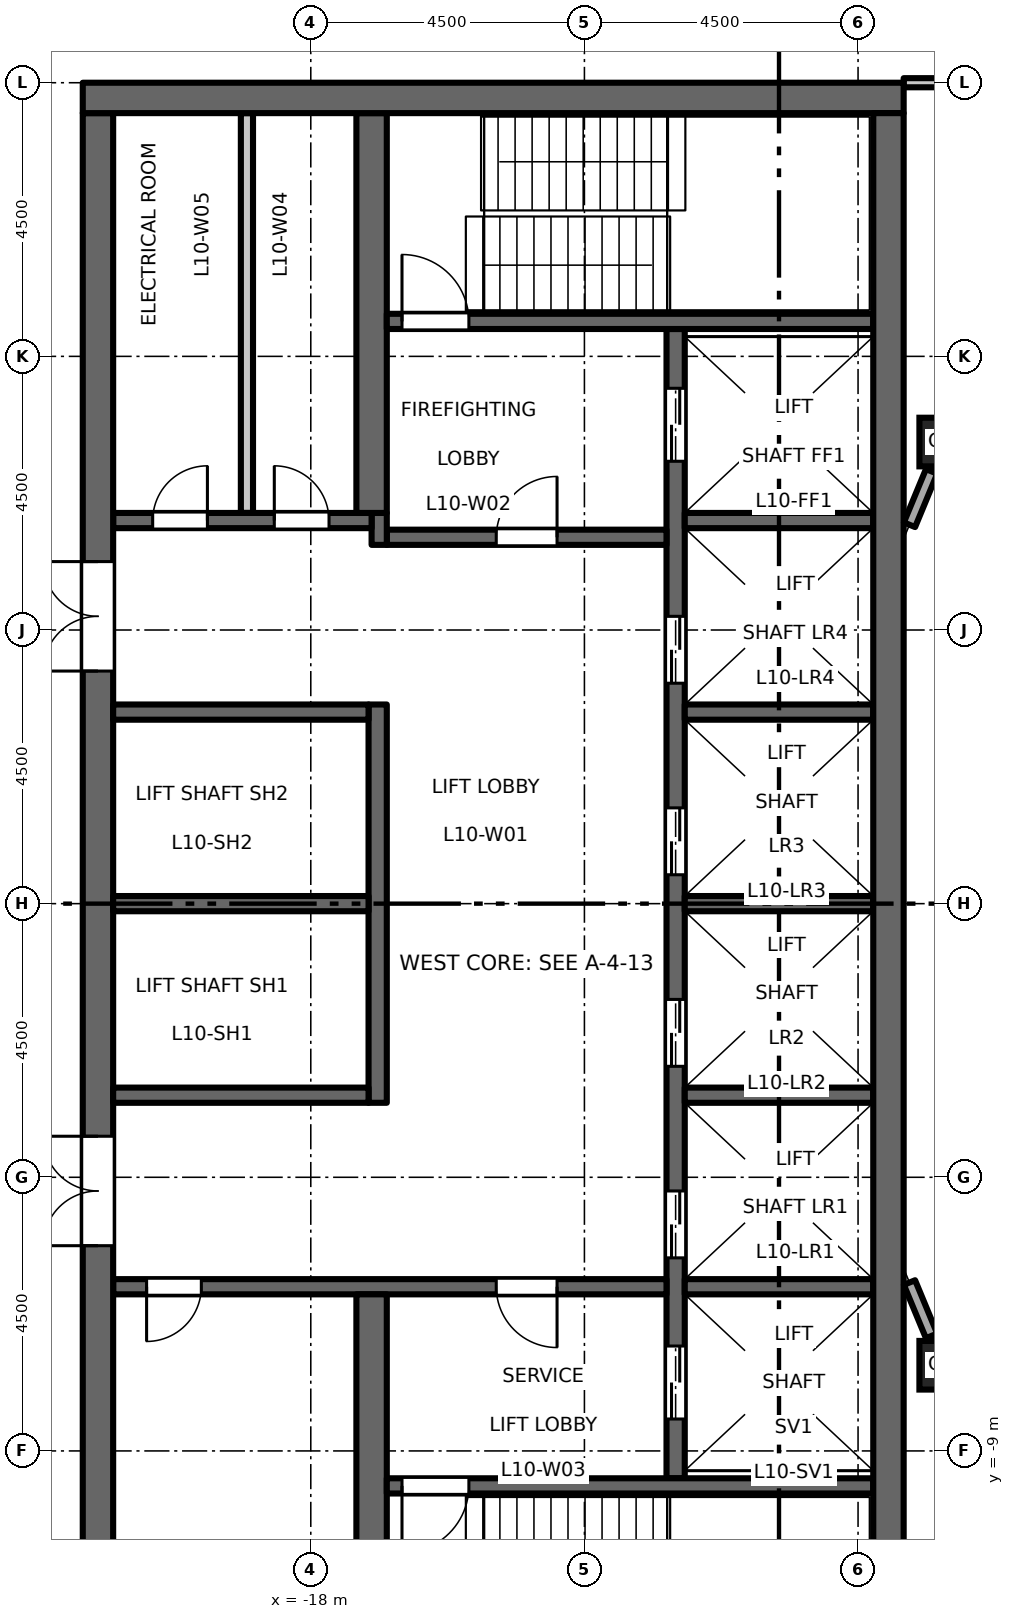
"""IFC4 building model, lengths in metres.
Left out: names, types, materials, properties, quantities, classifications, styles, units other than length and angle.
Written with IfcOpenShell. Run it as: python <this file> out.ifc"""

import sys

from ifc_helpers import new_model, si_unit, direction, frame, frame_2d, origin, origin_2d, place, context, subcontext, project, spatial, rectangle, hollow_rectangle, extrude, element, fill, save


model = new_model("IFC4")
c1 = context("Model", 3, precision=1e-05, world=origin(), true_north=direction((0.0, 1.0)))
c2 = subcontext(c1, "Body", "Model", "MODEL_VIEW")
j1 = project(units=[si_unit("LENGTHUNIT", "METRE"), si_unit("PLANEANGLEUNIT", "RADIAN")], contexts=[c1])
p1 = place(None, origin())
s1 = spatial("IfcSite", under=j1, at=p1, CompositionType="ELEMENT")
p2 = place(p1, origin())
s2 = spatial("IfcBuilding", under=s1, at=p2, CompositionType="ELEMENT")
p3 = place(p2, frame((0.0, 0.0, 49.2)))
s3 = spatial("IfcBuildingStorey", under=s2, at=p3, CompositionType="ELEMENT", Elevation=49.2)
for number, where, z_axis, x_axis in (
    (1, (-7.591, -7.591, 0.0), (0.0, 0.0, 1.0), (1.0, 0.0, 0.0)),
    (2, (-7.591, 7.591, 0.0), (0.0, 0.0, 1.0), (1.0, 0.0, 0.0)),
):
    element("IfcColumn", number, at=place(p3, frame(where, z_axis=z_axis, x_axis=x_axis)), inside=s3, PredefinedType="COLUMN", context=c2, shape_type="SweptSolid", body=[
        extrude(hollow_rectangle(XDim=0.8, YDim=0.8, WallThickness=0.05, at=origin_2d()), origin(), (0.0, 0.0, 1.0), 4.5),
    ])
p4 = place(p3, frame((-12.0, -9.45, 0.0), z_axis=(0.0, 0.0, 1.0), x_axis=(0.0, 1.0, 0.0)))
e3 = element("IfcWall", 3, at=p4, inside=s3, PredefinedType="SHEAR", context=c2, shape_type="SweptSolid", body=[
    extrude(rectangle(XDim=18.9, YDim=0.3, at=frame_2d((9.45, 0.0))), origin(), (0.0, 0.0, 1.0), 4.35),
])
p5 = place(p4, frame((3.625, 0.0, 0.0)))
e4 = element("IfcOpeningElement", 4, at=p5, cuts=e3, PredefinedType="OPENING", context=c2, shape_type="SweptSolid", body=[
    extrude(rectangle(XDim=1.1, YDim=2.1, at=frame_2d((0.55, 1.05))), frame((0.0, 0.16, 0.0), z_axis=(0.0, -1.0, 0.0), x_axis=(1.0, 0.0, 0.0)), (0.0, 0.0, 1.0), 0.32),
])
p6 = place(p4, frame((6.775, 0.0, 0.0)))
e5 = element("IfcOpeningElement", 5, at=p6, cuts=e3, PredefinedType="OPENING", context=c2, shape_type="SweptSolid", body=[
    extrude(rectangle(XDim=1.1, YDim=2.1, at=frame_2d((0.55, 1.05))), frame((0.0, 0.16, 0.0), z_axis=(0.0, -1.0, 0.0), x_axis=(1.0, 0.0, 0.0)), (0.0, 0.0, 1.0), 0.32),
])
p7 = place(p4, frame((9.925, 0.0, 0.0)))
e6 = element("IfcOpeningElement", 6, at=p7, cuts=e3, PredefinedType="OPENING", context=c2, shape_type="SweptSolid", body=[
    extrude(rectangle(XDim=1.1, YDim=2.1, at=frame_2d((0.55, 1.05))), frame((0.0, 0.16, 0.0), z_axis=(0.0, -1.0, 0.0), x_axis=(1.0, 0.0, 0.0)), (0.0, 0.0, 1.0), 0.32),
])
p8 = place(p4, frame((13.075, 0.0, 0.0)))
e7 = element("IfcOpeningElement", 7, at=p8, cuts=e3, PredefinedType="OPENING", context=c2, shape_type="SweptSolid", body=[
    extrude(rectangle(XDim=1.1, YDim=2.1, at=frame_2d((0.55, 1.05))), frame((0.0, 0.16, 0.0), z_axis=(0.0, -1.0, 0.0), x_axis=(1.0, 0.0, 0.0)), (0.0, 0.0, 1.0), 0.32),
])
p9 = place(p4, frame((16.725, 0.0, 0.0)))
e8 = element("IfcOpeningElement", 8, at=p9, cuts=e3, PredefinedType="OPENING", context=c2, shape_type="SweptSolid", body=[
    extrude(rectangle(XDim=1.2, YDim=2.1, at=frame_2d((0.6, 1.05))), frame((0.0, 0.16, 0.0), z_axis=(0.0, -1.0, 0.0), x_axis=(1.0, 0.0, 0.0)), (0.0, 0.0, 1.0), 0.32),
])
p10 = place(p4, frame((0.975, 0.0, 0.0)))
e9 = element("IfcOpeningElement", 9, at=p10, cuts=e3, PredefinedType="OPENING", context=c2, shape_type="SweptSolid", body=[
    extrude(rectangle(XDim=1.2, YDim=2.1, at=frame_2d((0.6, 1.05))), frame((0.0, 0.16, 0.0), z_axis=(0.0, -1.0, 0.0), x_axis=(1.0, 0.0, 0.0)), (0.0, 0.0, 1.0), 0.32),
])
p11 = place(p3, frame((-12.15, 6.025, 0.0), z_axis=(0.0, 0.0, 1.0), x_axis=(-1.0, 0.0, 0.0)))
e10 = element("IfcWall", 10, at=p11, inside=s3, PredefinedType="SHEAR", context=c2, shape_type="SweptSolid", body=[
    extrude(rectangle(XDim=4.6, YDim=0.25, at=frame_2d((2.3, 0.0))), origin(), (0.0, 0.0, 1.0), 4.35),
])
p12 = place(p11, frame((1.8, 0.0, 0.0)))
e11 = element("IfcOpeningElement", 11, at=p12, cuts=e10, PredefinedType="OPENING", context=c2, shape_type="SweptSolid", body=[
    extrude(rectangle(XDim=1.0, YDim=2.1, at=frame_2d((0.5, 1.05))), frame((0.0, 0.135, 0.0), z_axis=(0.0, -1.0, 0.0), x_axis=(1.0, 0.0, 0.0)), (0.0, 0.0, 1.0), 0.27),
])
p13 = place(p3, frame((-16.875, 5.9, 0.0), z_axis=(0.0, 0.0, 1.0), x_axis=(0.0, 1.0, 0.0)))
e12 = element("IfcWall", 12, at=p13, inside=s3, PredefinedType="SHEAR", context=c2, shape_type="SweptSolid", body=[
    extrude(rectangle(XDim=0.525, YDim=0.25, at=frame_2d((0.263, 0.0))), origin(), (0.0, 0.0, 1.0), 4.35),
])
p14 = place(p3, frame((-17.0, 6.3, 0.0), z_axis=(0.0, 0.0, 1.0), x_axis=(-1.0, 0.0, 0.0)))
e13 = element("IfcWall", 13, at=p14, inside=s3, PredefinedType="SHEAR", context=c2, shape_type="SweptSolid", body=[
    extrude(rectangle(XDim=4.25, YDim=0.25, at=frame_2d((2.125, 0.0))), origin(), (0.0, 0.0, 1.0), 4.35),
])
p15 = place(p14, frame((0.7, 0.0, 0.0)))
e14 = element("IfcOpeningElement", 14, at=p15, cuts=e13, PredefinedType="OPENING", context=c2, shape_type="SweptSolid", body=[
    extrude(rectangle(XDim=0.9, YDim=2.1, at=frame_2d((0.45, 1.05))), frame((0.0, 0.135, 0.0), z_axis=(0.0, -1.0, 0.0), x_axis=(1.0, 0.0, 0.0)), (0.0, 0.0, 1.0), 0.27),
])
p16 = place(p14, frame((2.7, 0.0, 0.0)))
e15 = element("IfcOpeningElement", 15, at=p16, cuts=e13, PredefinedType="OPENING", context=c2, shape_type="SweptSolid", body=[
    extrude(rectangle(XDim=0.9, YDim=2.1, at=frame_2d((0.45, 1.05))), frame((0.0, 0.135, 0.0), z_axis=(0.0, -1.0, 0.0), x_axis=(1.0, 0.0, 0.0)), (0.0, 0.0, 1.0), 0.27),
])
p17 = place(p3, frame((-12.15, -6.3, 0.0), z_axis=(0.0, 0.0, 1.0), x_axis=(-1.0, 0.0, 0.0)))
e16 = element("IfcWall", 16, at=p17, inside=s3, PredefinedType="SHEAR", context=c2, shape_type="SweptSolid", body=[
    extrude(rectangle(XDim=9.1, YDim=0.25, at=frame_2d((4.55, 0.0))), origin(), (0.0, 0.0, 1.0), 4.35),
])
p18 = place(p17, frame((1.8, 0.0, 0.0)))
e17 = element("IfcOpeningElement", 17, at=p18, cuts=e16, PredefinedType="OPENING", context=c2, shape_type="SweptSolid", body=[
    extrude(rectangle(XDim=1.0, YDim=2.1, at=frame_2d((0.5, 1.05))), frame((0.0, 0.135, 0.0), z_axis=(0.0, -1.0, 0.0), x_axis=(1.0, 0.0, 0.0)), (0.0, 0.0, 1.0), 0.27),
])
p19 = place(p17, frame((7.65, 0.0, 0.0)))
e18 = element("IfcOpeningElement", 18, at=p19, cuts=e16, PredefinedType="OPENING", context=c2, shape_type="SweptSolid", body=[
    extrude(rectangle(XDim=0.9, YDim=2.1, at=frame_2d((0.45, 1.05))), frame((0.0, 0.135, 0.0), z_axis=(0.0, -1.0, 0.0), x_axis=(1.0, 0.0, 0.0)), (0.0, 0.0, 1.0), 0.27),
])
p20 = place(p3, frame((-21.5, -13.0, 0.0), z_axis=(0.0, 0.0, 1.0), x_axis=(0.0, 1.0, 0.0)))
e19 = element("IfcWall", 19, at=p20, inside=s3, PredefinedType="SHEAR", context=c2, shape_type="SweptSolid", body=[
    extrude(rectangle(XDim=26.0, YDim=0.5, at=frame_2d((13.0, 0.0))), origin(), (0.0, 0.0, 1.0), 4.35),
])
p21 = place(p20, frame((16.825, 0.0, 0.0)))
e20 = element("IfcOpeningElement", 20, at=p21, cuts=e19, PredefinedType="OPENING", context=c2, shape_type="SweptSolid", body=[
    extrude(rectangle(XDim=1.8, YDim=2.1, at=frame_2d((0.9, 1.05))), frame((0.0, 0.26, 0.0), z_axis=(0.0, -1.0, 0.0), x_axis=(1.0, 0.0, 0.0)), (0.0, 0.0, 1.0), 0.52),
])
p22 = place(p20, frame((7.375, 0.0, 0.0)))
e21 = element("IfcOpeningElement", 21, at=p22, cuts=e19, PredefinedType="OPENING", context=c2, shape_type="SweptSolid", body=[
    extrude(rectangle(XDim=1.8, YDim=2.1, at=frame_2d((0.9, 1.05))), frame((0.0, 0.26, 0.0), z_axis=(0.0, -1.0, 0.0), x_axis=(1.0, 0.0, 0.0)), (0.0, 0.0, 1.0), 0.52),
])
p23 = place(p3, frame((-19.05, 6.425, 0.0), z_axis=(0.0, 0.0, 1.0), x_axis=(0.0, 1.0, 0.0)))
e22 = element("IfcWall", 22, at=p23, inside=s3, PredefinedType="PARTITIONING", context=c2, shape_type="SweptSolid", body=[
    extrude(rectangle(XDim=6.575, YDim=0.2, at=frame_2d((3.288, 0.0))), origin(), (0.0, 0.0, 1.0), 4.35),
])
p24 = place(p3, frame((-16.9, -3.275, 0.0), z_axis=(0.0, 0.0, 1.0), x_axis=(0.0, 1.0, 0.0)))
e23 = element("IfcWall", 23, at=p24, inside=s3, PredefinedType="SHEAR", context=c2, shape_type="SweptSolid", body=[
    extrude(rectangle(XDim=6.55, YDim=0.3, at=frame_2d((3.275, 0.0))), origin(), (0.0, 0.0, 1.0), 4.35),
])
for number, where, z_axis, x_axis in (
    (24, (-17.05, 0.0, 0.0), (0.0, 0.0, 1.0), (-1.0, 0.0, 0.0)),
    (25, (-17.05, 3.15, 0.0), (0.0, 0.0, 1.0), (-1.0, 0.0, 0.0)),
    (26, (-17.05, -3.15, 0.0), (0.0, 0.0, 1.0), (-1.0, 0.0, 0.0)),
):
    element("IfcWall", number, at=place(p3, frame(where, z_axis=z_axis, x_axis=x_axis)), inside=s3, PredefinedType="SHEAR", context=c2, shape_type="SweptSolid", body=[
        extrude(rectangle(XDim=4.2, YDim=0.25, at=frame_2d((2.1, 0.0))), origin(), (0.0, 0.0, 1.0), 4.35),
    ])
for number, where, z_axis, x_axis in (
    (27, (-17.0, 6.425, 0.0), (0.0, 0.0, 1.0), (0.0, 1.0, 0.0)),
    (28, (-17.0, -13.0, 0.0), (0.0, 0.0, 1.0), (0.0, 1.0, 0.0)),
):
    element("IfcWall", number, at=place(p3, frame(where, z_axis=z_axis, x_axis=x_axis)), inside=s3, PredefinedType="SHEAR", context=c2, shape_type="SweptSolid", body=[
        extrude(rectangle(XDim=6.575, YDim=0.5, at=frame_2d((3.288, 0.0))), origin(), (0.0, 0.0, 1.0), 4.35),
    ])
for number, where, z_axis, x_axis in (
    (29, (-8.75, 0.0, 0.0), (0.0, 0.0, 1.0), (-1.0, 0.0, 0.0)),
    (30, (-8.75, 3.15, 0.0), (0.0, 0.0, 1.0), (-1.0, 0.0, 0.0)),
    (31, (-8.75, 6.3, 0.0), (0.0, 0.0, 1.0), (-1.0, 0.0, 0.0)),
    (32, (-8.75, -3.15, 0.0), (0.0, 0.0, 1.0), (-1.0, 0.0, 0.0)),
    (33, (-8.75, -6.3, 0.0), (0.0, 0.0, 1.0), (-1.0, 0.0, 0.0)),
):
    element("IfcWall", number, at=place(p3, frame(where, z_axis=z_axis, x_axis=x_axis)), inside=s3, PredefinedType="SHEAR", context=c2, shape_type="SweptSolid", body=[
        extrude(rectangle(XDim=3.1, YDim=0.25, at=frame_2d((1.55, 0.0))), origin(), (0.0, 0.0, 1.0), 4.35),
    ])
p25 = place(p3, frame((-8.75, 9.575, 0.0), z_axis=(0.0, 0.0, 1.0), x_axis=(-1.0, 0.0, 0.0)))
e34 = element("IfcWall", 34, at=p25, inside=s3, PredefinedType="SHEAR", context=c2, shape_type="SweptSolid", body=[
    extrude(rectangle(XDim=8.0, YDim=0.25, at=frame_2d((4.0, 0.0))), origin(), (0.0, 0.0, 1.0), 4.35),
])
p26 = place(p25, frame((6.65, 0.0, 0.0)))
e35 = element("IfcOpeningElement", 35, at=p26, cuts=e34, PredefinedType="OPENING", context=c2, shape_type="SweptSolid", body=[
    extrude(rectangle(XDim=1.1, YDim=2.1, at=frame_2d((0.55, 1.05))), frame((0.0, 0.135, 0.0), z_axis=(0.0, -1.0, 0.0), x_axis=(1.0, 0.0, 0.0)), (0.0, 0.0, 1.0), 0.27),
])
p27 = place(p3, frame((-8.75, -9.575, 0.0), z_axis=(0.0, 0.0, 1.0), x_axis=(-1.0, 0.0, 0.0)))
e36 = element("IfcWall", 36, at=p27, inside=s3, PredefinedType="SHEAR", context=c2, shape_type="SweptSolid", body=[
    extrude(rectangle(XDim=8.0, YDim=0.25, at=frame_2d((4.0, 0.0))), origin(), (0.0, 0.0, 1.0), 4.35),
])
p28 = place(p27, frame((6.65, 0.0, 0.0)))
e37 = element("IfcOpeningElement", 37, at=p28, cuts=e36, PredefinedType="OPENING", context=c2, shape_type="SweptSolid", body=[
    extrude(rectangle(XDim=1.1, YDim=2.1, at=frame_2d((0.55, 1.05))), frame((0.0, 0.135, 0.0), z_axis=(0.0, -1.0, 0.0), x_axis=(1.0, 0.0, 0.0)), (0.0, 0.0, 1.0), 0.27),
])
p29 = place(p3, frame((-8.25, 13.25, 0.0), z_axis=(0.0, 0.0, 1.0), x_axis=(-1.0, 0.0, 0.0)))
e38 = element("IfcWall", 38, at=p29, inside=s3, PredefinedType="SHEAR", context=c2, shape_type="SweptSolid", body=[
    extrude(rectangle(XDim=13.5, YDim=0.5, at=frame_2d((6.75, 0.0))), origin(), (0.0, 0.0, 1.0), 4.35),
])
p30 = place(p3, frame((-8.5, -13.0, 0.0), z_axis=(0.0, 0.0, 1.0), x_axis=(0.0, 1.0, 0.0)))
e39 = element("IfcWall", 39, at=p30, inside=s3, PredefinedType="SHEAR", context=c2, shape_type="SweptSolid", body=[
    extrude(rectangle(XDim=26.0, YDim=0.5, at=frame_2d((13.0, 0.0))), origin(), (0.0, 0.0, 1.0), 4.35),
])
for number, where, z_axis, x_axis in (
    (40, (-7.791, 7.108, 0.0), (0.0, 0.0, 1.0), (-0.383, -0.924, 0.0)),
    (41, (-8.154, -6.231, 0.0), (0.0, 0.0, 1.0), (0.383, -0.924, 0.0)),
):
    element("IfcWall", number, at=place(p3, frame(where, z_axis=z_axis, x_axis=x_axis)), inside=s3, PredefinedType="STANDARD", context=c2, shape_type="SweptSolid", body=[
        extrude(rectangle(XDim=0.949, YDim=0.2, at=frame_2d((0.475, 0.0))), origin(), (0.0, 0.0, 1.0), 3.73),
    ])
p31 = place(p3, frame((-8.25, 13.5, 0.0), z_axis=(0.0, 0.0, 1.0), x_axis=(1.0, 0.0, 0.0)))
e42 = element("IfcWall", 42, at=p31, inside=s3, PredefinedType="PARTITIONING", context=c2, shape_type="SweptSolid", body=[
    extrude(rectangle(XDim=16.5, YDim=0.15, at=frame_2d((8.25, 0.0))), origin(), (0.0, 0.0, 1.0), 3.85),
])
p32 = place(p31, frame((0.65, 0.0, 0.0)))
e43 = element("IfcOpeningElement", 43, at=p32, cuts=e42, PredefinedType="OPENING", context=c2, shape_type="SweptSolid", body=[
    extrude(rectangle(XDim=1.0, YDim=2.1, at=frame_2d((0.5, 1.05))), frame((0.0, 0.085, 0.0), z_axis=(0.0, -1.0, 0.0), x_axis=(1.0, 0.0, 0.0)), (0.0, 0.0, 1.0), 0.17),
])
p33 = place(p12, origin())
e44 = element("IfcDoor", 44, at=p33, inside=s3, OperationType="SINGLE_SWING_LEFT", PredefinedType="DOOR", context=c2, shape_type="SweptSolid", body=[
    extrude(rectangle(XDim=1.0, YDim=2.1, at=frame_2d((0.5, 1.05))), frame((0.0, 0.025, 0.0), z_axis=(0.0, -1.0, 0.0), x_axis=(1.0, 0.0, 0.0)), (0.0, 0.0, 1.0), 0.05),
])
fill(e11, e44)
p34 = place(p18, origin())
e45 = element("IfcDoor", 45, at=p34, inside=s3, OperationType="SINGLE_SWING_RIGHT", PredefinedType="DOOR", context=c2, shape_type="SweptSolid", body=[
    extrude(rectangle(XDim=1.0, YDim=2.1, at=frame_2d((0.5, 1.05))), frame((0.0, 0.025, 0.0), z_axis=(0.0, -1.0, 0.0), x_axis=(1.0, 0.0, 0.0)), (0.0, 0.0, 1.0), 0.05),
])
fill(e17, e45)
p35 = place(p26, origin())
e46 = element("IfcDoor", 46, at=p35, inside=s3, OperationType="SINGLE_SWING_RIGHT", PredefinedType="DOOR", context=c2, shape_type="SweptSolid", body=[
    extrude(rectangle(XDim=1.1, YDim=2.1, at=frame_2d((0.55, 1.05))), frame((0.0, 0.025, 0.0), z_axis=(0.0, -1.0, 0.0), x_axis=(1.0, 0.0, 0.0)), (0.0, 0.0, 1.0), 0.05),
])
fill(e35, e46)
p36 = place(p28, origin())
e47 = element("IfcDoor", 47, at=p36, inside=s3, OperationType="SINGLE_SWING_LEFT", PredefinedType="DOOR", context=c2, shape_type="SweptSolid", body=[
    extrude(rectangle(XDim=1.1, YDim=2.1, at=frame_2d((0.55, 1.05))), frame((0.0, 0.025, 0.0), z_axis=(0.0, -1.0, 0.0), x_axis=(1.0, 0.0, 0.0)), (0.0, 0.0, 1.0), 0.05),
])
fill(e37, e47)
p37 = place(p21, origin())
e48 = element("IfcDoor", 48, at=p37, inside=s3, OperationType="DOUBLE_DOOR_DOUBLE_SWING", PredefinedType="DOOR", context=c2, shape_type="SweptSolid", body=[
    extrude(rectangle(XDim=1.8, YDim=2.1, at=frame_2d((0.9, 1.05))), frame((0.0, 0.025, 0.0), z_axis=(0.0, -1.0, 0.0), x_axis=(1.0, 0.0, 0.0)), (0.0, 0.0, 1.0), 0.05),
])
fill(e20, e48)
p38 = place(p22, origin())
e49 = element("IfcDoor", 49, at=p38, inside=s3, OperationType="DOUBLE_DOOR_DOUBLE_SWING", PredefinedType="DOOR", context=c2, shape_type="SweptSolid", body=[
    extrude(rectangle(XDim=1.8, YDim=2.1, at=frame_2d((0.9, 1.05))), frame((0.0, 0.025, 0.0), z_axis=(0.0, -1.0, 0.0), x_axis=(1.0, 0.0, 0.0)), (0.0, 0.0, 1.0), 0.05),
])
fill(e21, e49)
p39 = place(p5, origin())
e50 = element("IfcDoor", 50, at=p39, inside=s3, OperationType="DOUBLE_DOOR_SLIDING", PredefinedType="DOOR", context=c2, shape_type="SweptSolid", body=[
    extrude(rectangle(XDim=1.1, YDim=2.1, at=frame_2d((0.55, 1.05))), frame((0.0, 0.025, 0.0), z_axis=(0.0, -1.0, 0.0), x_axis=(1.0, 0.0, 0.0)), (0.0, 0.0, 1.0), 0.05),
])
fill(e4, e50)
p40 = place(p6, origin())
e51 = element("IfcDoor", 51, at=p40, inside=s3, OperationType="DOUBLE_DOOR_SLIDING", PredefinedType="DOOR", context=c2, shape_type="SweptSolid", body=[
    extrude(rectangle(XDim=1.1, YDim=2.1, at=frame_2d((0.55, 1.05))), frame((0.0, 0.025, 0.0), z_axis=(0.0, -1.0, 0.0), x_axis=(1.0, 0.0, 0.0)), (0.0, 0.0, 1.0), 0.05),
])
fill(e5, e51)
p41 = place(p7, origin())
e52 = element("IfcDoor", 52, at=p41, inside=s3, OperationType="DOUBLE_DOOR_SLIDING", PredefinedType="DOOR", context=c2, shape_type="SweptSolid", body=[
    extrude(rectangle(XDim=1.1, YDim=2.1, at=frame_2d((0.55, 1.05))), frame((0.0, 0.025, 0.0), z_axis=(0.0, -1.0, 0.0), x_axis=(1.0, 0.0, 0.0)), (0.0, 0.0, 1.0), 0.05),
])
fill(e6, e52)
p42 = place(p8, origin())
e53 = element("IfcDoor", 53, at=p42, inside=s3, OperationType="DOUBLE_DOOR_SLIDING", PredefinedType="DOOR", context=c2, shape_type="SweptSolid", body=[
    extrude(rectangle(XDim=1.1, YDim=2.1, at=frame_2d((0.55, 1.05))), frame((0.0, 0.025, 0.0), z_axis=(0.0, -1.0, 0.0), x_axis=(1.0, 0.0, 0.0)), (0.0, 0.0, 1.0), 0.05),
])
fill(e7, e53)
p43 = place(p9, origin())
e54 = element("IfcDoor", 54, at=p43, inside=s3, OperationType="DOUBLE_DOOR_SLIDING", PredefinedType="DOOR", context=c2, shape_type="SweptSolid", body=[
    extrude(rectangle(XDim=1.2, YDim=2.1, at=frame_2d((0.6, 1.05))), frame((0.0, 0.025, 0.0), z_axis=(0.0, -1.0, 0.0), x_axis=(1.0, 0.0, 0.0)), (0.0, 0.0, 1.0), 0.05),
])
fill(e8, e54)
p44 = place(p10, origin())
e55 = element("IfcDoor", 55, at=p44, inside=s3, OperationType="DOUBLE_DOOR_SLIDING", PredefinedType="DOOR", context=c2, shape_type="SweptSolid", body=[
    extrude(rectangle(XDim=1.2, YDim=2.1, at=frame_2d((0.6, 1.05))), frame((0.0, 0.025, 0.0), z_axis=(0.0, -1.0, 0.0), x_axis=(1.0, 0.0, 0.0)), (0.0, 0.0, 1.0), 0.05),
])
fill(e9, e55)
p45 = place(p15, origin())
e56 = element("IfcDoor", 56, at=p45, inside=s3, OperationType="SINGLE_SWING_RIGHT", PredefinedType="DOOR", context=c2, shape_type="SweptSolid", body=[
    extrude(rectangle(XDim=0.9, YDim=2.1, at=frame_2d((0.45, 1.05))), frame((0.0, 0.025, 0.0), z_axis=(0.0, -1.0, 0.0), x_axis=(1.0, 0.0, 0.0)), (0.0, 0.0, 1.0), 0.05),
])
fill(e14, e56)
p46 = place(p16, origin())
e57 = element("IfcDoor", 57, at=p46, inside=s3, OperationType="SINGLE_SWING_LEFT", PredefinedType="DOOR", context=c2, shape_type="SweptSolid", body=[
    extrude(rectangle(XDim=0.9, YDim=2.1, at=frame_2d((0.45, 1.05))), frame((0.0, 0.025, 0.0), z_axis=(0.0, -1.0, 0.0), x_axis=(1.0, 0.0, 0.0)), (0.0, 0.0, 1.0), 0.05),
])
fill(e15, e57)
p47 = place(p19, origin())
e58 = element("IfcDoor", 58, at=p47, inside=s3, OperationType="SINGLE_SWING_LEFT", PredefinedType="DOOR", context=c2, shape_type="SweptSolid", body=[
    extrude(rectangle(XDim=0.9, YDim=2.1, at=frame_2d((0.45, 1.05))), frame((0.0, 0.025, 0.0), z_axis=(0.0, -1.0, 0.0), x_axis=(1.0, 0.0, 0.0)), (0.0, 0.0, 1.0), 0.05),
])
fill(e18, e58)
save(model, sys.argv[1])
